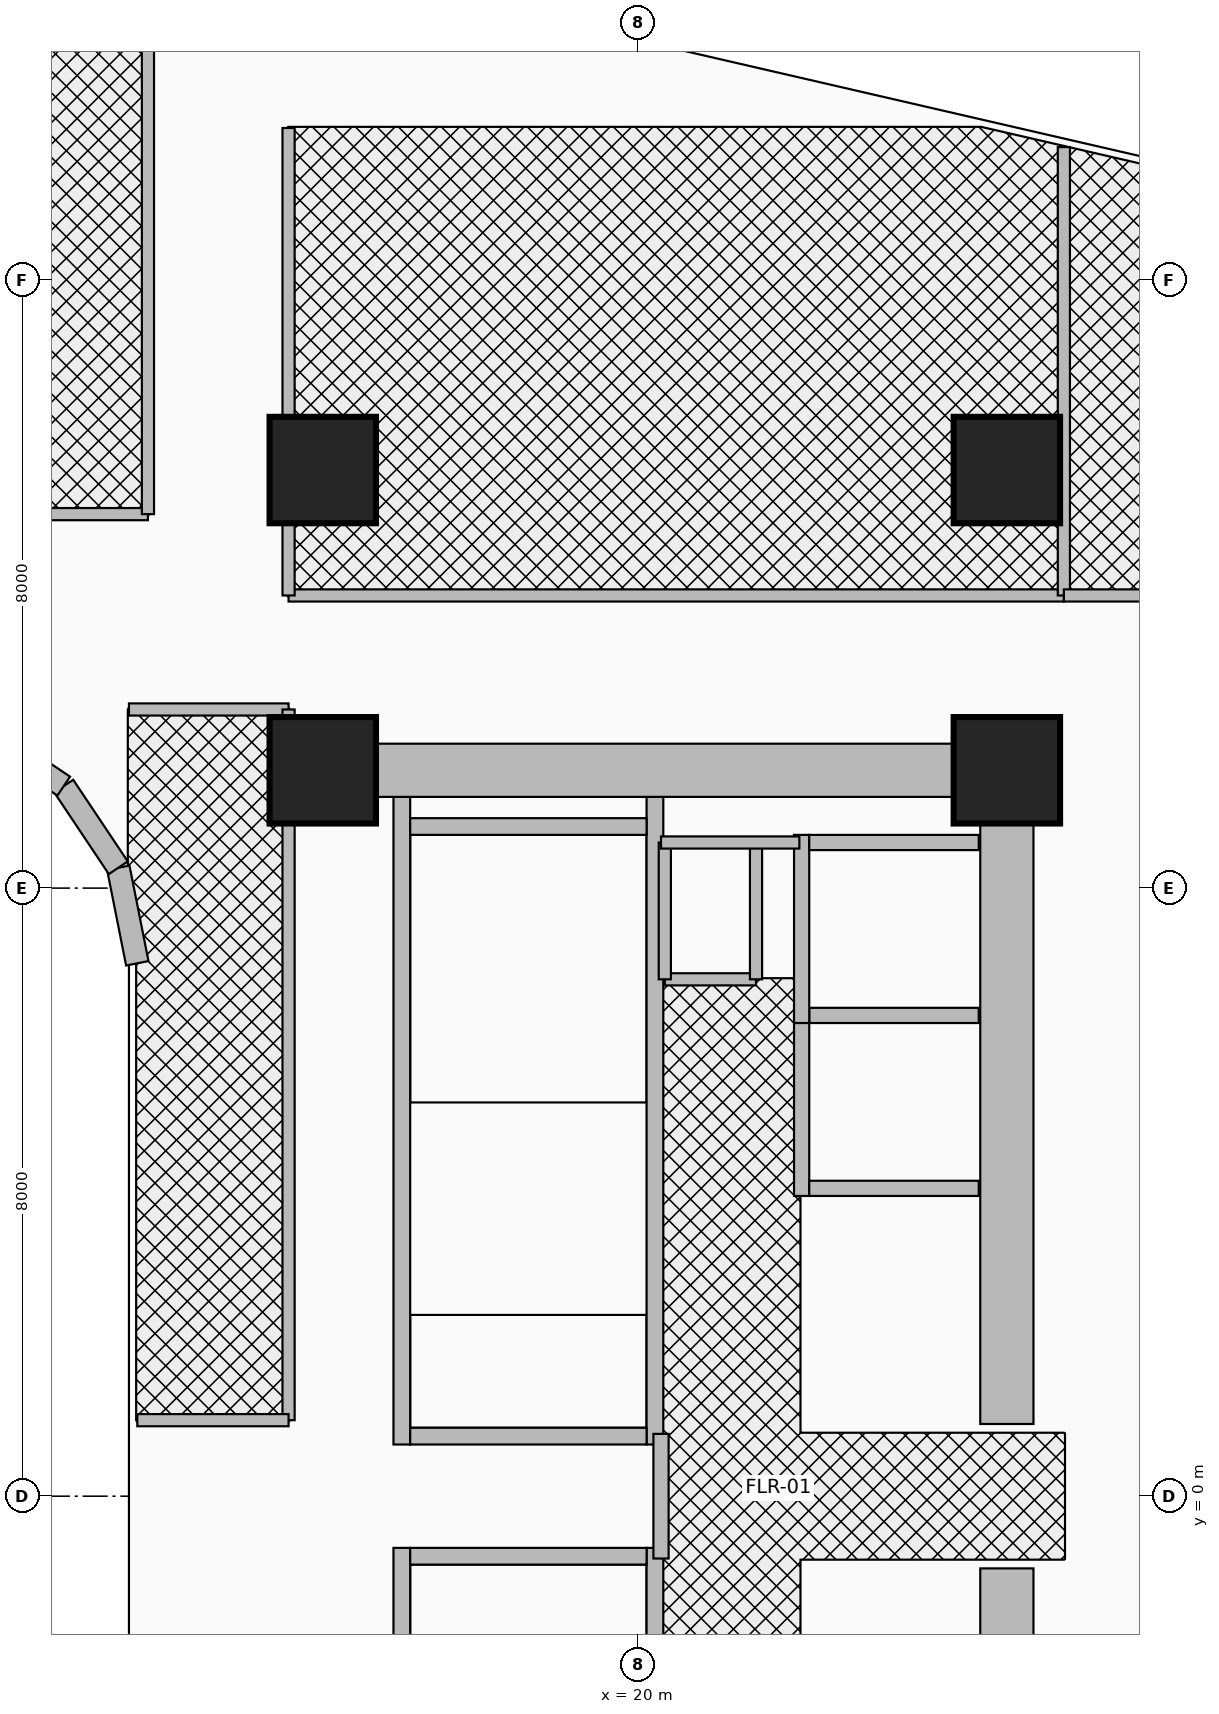
"""IFC4 building model, lengths in metres.
Left out: names, types, materials, properties, quantities, classifications, styles, units other than length and angle.
Written with IfcOpenShell. Run it as: python <this file> out.ifc"""

import sys

from ifc_helpers import new_model, si_unit, direction, frame, frame_2d, origin, origin_2d, place, context, subcontext, project, spatial, rectangle, extrude, source, transform, mapped, element, fill, save


model = new_model("IFC4")
c1 = context("Model", 3, precision=1e-05, world=origin(), true_north=direction((0.0, 1.0)))
c2 = subcontext(c1, "Body", "Model", "MODEL_VIEW")
j1 = project(units=[si_unit("LENGTHUNIT", "METRE"), si_unit("PLANEANGLEUNIT", "RADIAN")], contexts=[c1])
p1 = place(None, origin())
s1 = spatial("IfcSite", under=j1, at=p1, CompositionType="ELEMENT")
p2 = place(p1, origin())
s2 = spatial("IfcBuilding", under=s1, at=p2, CompositionType="ELEMENT")
p3 = place(p2, frame((0.0, 0.0, 70.4)))
s3 = spatial("IfcBuildingStorey", under=s2, at=p3, CompositionType="ELEMENT", Elevation=70.4)
for number, where, z_axis, x_axis in (
    (1, (16.89, 0.68, 0.0), (0.0, 0.0, 1.0), (0.0, 1.0, 0.0)),
    (2, (20.22, 0.68, 0.0), (0.0, 0.0, 1.0), (0.0, 1.0, 0.0)),
):
    element("IfcWall", number, at=place(p3, frame(where, z_axis=z_axis, x_axis=x_axis)), inside=s3, PredefinedType="SHEAR", context=c2, shape_type="SweptSolid", body=[
        extrude(rectangle(XDim=8.52, YDim=0.22, at=frame_2d((4.26, 0.0))), origin(), (0.0, 0.0, 1.0), 3.46),
    ])
p4 = place(p3, frame((17.0, 0.79, 0.0), z_axis=(0.0, 0.0, 1.0), x_axis=(1.0, 0.0, 0.0)))
e3 = element("IfcWall", 3, at=p4, inside=s3, PredefinedType="SHEAR", context=c2, shape_type="SweptSolid", body=[
    extrude(rectangle(XDim=3.11, YDim=0.22, at=frame_2d((1.555, 0.0))), origin(), (0.0, 0.0, 1.0), 3.46),
])
p5 = place(p4, frame((0.95, 0.0, 0.0)))
e4 = element("IfcOpeningElement", 4, at=p5, cuts=e3, PredefinedType="OPENING", context=c2, shape_type="SweptSolid", body=[
    extrude(rectangle(XDim=1.1, YDim=2.15, at=frame_2d((0.55, 1.075))), frame((0.0, 0.125, 0.0), z_axis=(0.0, -1.0, 0.0), x_axis=(1.0, 0.0, 0.0)), (0.0, 0.0, 1.0), 0.25),
])
p6 = place(p3, frame((17.0, 8.81, 0.0), z_axis=(0.0, 0.0, 1.0), x_axis=(1.0, 0.0, 0.0)))
e5 = element("IfcWall", 5, at=p6, inside=s3, PredefinedType="SHEAR", context=c2, shape_type="SweptSolid", body=[
    extrude(rectangle(XDim=3.11, YDim=0.22, at=frame_2d((1.555, 0.0))), origin(), (0.0, 0.0, 1.0), 3.46),
])
for number, where, z_axis, x_axis in (
    (6, (16.89, -9.2, 0.0), (0.0, 0.0, 1.0), (0.0, 1.0, 0.0)),
    (7, (20.22, -9.2, 0.0), (0.0, 0.0, 1.0), (0.0, 1.0, 0.0)),
):
    element("IfcWall", number, at=place(p3, frame(where, z_axis=z_axis, x_axis=x_axis)), inside=s3, PredefinedType="SHEAR", context=c2, shape_type="SweptSolid", body=[
        extrude(rectangle(XDim=8.52, YDim=0.22, at=frame_2d((4.26, 0.0))), origin(), (0.0, 0.0, 1.0), 3.46),
    ])
p7 = place(p3, frame((17.0, -0.79, 0.0), z_axis=(0.0, 0.0, 1.0), x_axis=(1.0, 0.0, 0.0)))
e8 = element("IfcWall", 8, at=p7, inside=s3, PredefinedType="SHEAR", context=c2, shape_type="SweptSolid", body=[
    extrude(rectangle(XDim=3.11, YDim=0.22, at=frame_2d((1.555, 0.0))), origin(), (0.0, 0.0, 1.0), 3.46),
])
p8 = place(p7, frame((0.95, 0.0, 0.0)))
e9 = element("IfcOpeningElement", 9, at=p8, cuts=e8, PredefinedType="OPENING", context=c2, shape_type="SweptSolid", body=[
    extrude(rectangle(XDim=1.1, YDim=2.15, at=frame_2d((0.55, 1.075))), frame((0.0, 0.125, 0.0), z_axis=(0.0, -1.0, 0.0), x_axis=(1.0, 0.0, 0.0)), (0.0, 0.0, 1.0), 0.25),
])
for number, where, z_axis, x_axis in (
    (10, (24.85, -9.9, 0.0), (0.0, 0.0, 1.0), (0.0, 1.0, 0.0)),
    (11, (24.85, 0.95, 0.0), (0.0, 0.0, 1.0), (0.0, 1.0, 0.0)),
):
    element("IfcWall", number, at=place(p3, frame(where, z_axis=z_axis, x_axis=x_axis)), inside=s3, PredefinedType="SHEAR", context=c2, shape_type="SweptSolid", body=[
        extrude(rectangle(XDim=8.95, YDim=0.7, at=frame_2d((4.475, 0.0))), origin(), (0.0, 0.0, 1.0), 3.46),
    ])
p9 = place(p3, frame((15.85, 9.55, 0.0), z_axis=(0.0, 0.0, 1.0), x_axis=(1.0, 0.0, 0.0)))
e12 = element("IfcWall", 12, at=p9, inside=s3, PredefinedType="SHEAR", context=c2, shape_type="SweptSolid", body=[
    extrude(rectangle(XDim=9.0, YDim=0.7, at=frame_2d((4.5, 0.0))), origin(), (0.0, 0.0, 1.0), 3.46),
])
m1 = source(origin(), c2, "Body", "SweptSolid", [
    extrude(rectangle(XDim=1.4, YDim=1.4, at=origin_2d()), origin(), (0.0, 0.0, 1.0), 3.7),
])
for number, where, z_axis, x_axis in (
    (13, (15.85, 9.55, 0.0), (0.0, 0.0, 1.0), (1.0, 0.0, 0.0)),
    (14, (24.85, 9.55, 0.0), (0.0, 0.0, 1.0), (1.0, 0.0, 0.0)),
    (15, (15.85, 13.5, 0.0), (0.0, 0.0, 1.0), (1.0, 0.0, 0.0)),
    (16, (24.85, 13.5, 0.0), (0.0, 0.0, 1.0), (1.0, 0.0, 0.0)),
):
    element("IfcColumn", number, at=place(p3, frame(where, z_axis=z_axis, x_axis=x_axis)), inside=s3, PredefinedType="COLUMN", context=c2, shape_type="MappedRepresentation", body=[
        mapped(m1, transform((0.0, 0.0, 0.0), x_axis=(1.0, 0.0, 0.0), y_axis=(0.0, 1.0, 0.0), z_axis=(0.0, 0.0, 1.0), scale=1.0)),
    ])
p10 = place(p3, frame((13.41, 7.011, 0.0), z_axis=(0.0, 0.0, 1.0), x_axis=(-0.195090163074, 0.980785312019, 0.0)))
e17 = element("IfcWall", 17, at=p10, inside=s3, PredefinedType="SOLIDWALL", context=c2, shape_type="SweptSolid", body=[
    extrude(rectangle(XDim=1.281, YDim=0.3, at=frame_2d((0.641, 0.0))), origin(), (0.0, 0.0, 1.0), 3.46),
])
for number, where, z_axis, x_axis in (
    (18, (13.16, 8.268, 0.0), (0.0, 0.0, 1.0), (-0.556, 0.831, 0.0)),
    (19, (12.442, 9.342, 0.0), (0.0, 0.0, 1.0), (-0.831, 0.556, 0.0)),
):
    element("IfcWall", number, at=place(p3, frame(where, z_axis=z_axis, x_axis=x_axis)), inside=s3, PredefinedType="SOLIDWALL", context=c2, shape_type="SweptSolid", body=[
        extrude(rectangle(XDim=1.292, YDim=0.3, at=frame_2d((0.646, 0.0))), origin(), (0.0, 0.0, 1.0), 3.46),
    ])
p11 = place(p3, frame((22.15, 3.95, 0.0), z_axis=(0.0, 0.0, 1.0), x_axis=(0.0, 1.0, 0.0)))
e20 = element("IfcWall", 20, at=p11, inside=s3, PredefinedType="MOVABLE", context=c2, shape_type="SweptSolid", body=[
    extrude(rectangle(XDim=2.475, YDim=0.2, at=frame_2d((1.238, 0.0))), origin(), (0.0, 0.0, 1.0), 3.46),
])
for number, where, z_axis, x_axis in (
    (21, (22.25, 4.05, 0.0), (0.0, 0.0, 1.0), (1.0, 0.0, 0.0)),
    (22, (22.25, 6.325, 0.0), (0.0, 0.0, 1.0), (1.0, 0.0, 0.0)),
):
    element("IfcWall", number, at=place(p3, frame(where, z_axis=z_axis, x_axis=x_axis)), inside=s3, PredefinedType="MOVABLE", context=c2, shape_type="SweptSolid", body=[
        extrude(rectangle(XDim=2.23, YDim=0.2, at=frame_2d((1.115, 0.0))), origin(), (0.0, 0.0, 1.0), 2.245),
    ])
p12 = place(p3, frame((22.15, 6.225, 0.0), z_axis=(0.0, 0.0, 1.0), x_axis=(0.0, 1.0, 0.0)))
e23 = element("IfcWall", 23, at=p12, inside=s3, PredefinedType="MOVABLE", context=c2, shape_type="SweptSolid", body=[
    extrude(rectangle(XDim=2.475, YDim=0.2, at=frame_2d((1.237, 0.0))), origin(), (0.0, 0.0, 1.0), 3.46),
])
p13 = place(p3, frame((22.25, 8.6, 0.0), z_axis=(0.0, 0.0, 1.0), x_axis=(1.0, 0.0, 0.0)))
e24 = element("IfcWall", 24, at=p13, inside=s3, PredefinedType="MOVABLE", context=c2, shape_type="SweptSolid", body=[
    extrude(rectangle(XDim=2.23, YDim=0.2, at=frame_2d((1.115, 0.0))), origin(), (0.0, 0.0, 1.0), 2.245),
])
p14 = place(p3, frame((20.3, -0.82, 0.0), z_axis=(0.0, 0.0, 1.0), x_axis=(0.0, 1.0, 0.0)))
e25 = element("IfcWall", 25, at=p14, inside=s3, PredefinedType="PARTITIONING", context=c2, shape_type="SweptSolid", body=[
    extrude(rectangle(XDim=1.64, YDim=0.2, at=frame_2d((0.82, 0.0))), origin(), (0.0, 0.0, 1.0), 3.46),
])
p15 = place(p14, frame((0.295, 0.0, 0.0)))
e26 = element("IfcOpeningElement", 26, at=p15, cuts=e25, PredefinedType="OPENING", context=c2, shape_type="SweptSolid", body=[
    extrude(rectangle(XDim=1.05, YDim=2.15, at=frame_2d((0.525, 1.075))), frame((0.0, 0.115, 0.0), z_axis=(0.0, -1.0, 0.0), x_axis=(1.0, 0.0, 0.0)), (0.0, 0.0, 1.0), 0.23),
])
p16 = place(p3, frame((20.35, 6.8, 0.0), z_axis=(0.0, 0.0, 1.0), x_axis=(1.0, 0.0, 0.0)))
e27 = element("IfcWall", 27, at=p16, inside=s3, PredefinedType="PARTITIONING", context=c2, shape_type="SweptSolid", body=[
    extrude(rectangle(XDim=1.2, YDim=0.16, at=frame_2d((0.6, 0.0))), origin(), (0.0, 0.0, 1.0), 3.46),
])
p17 = place(p16, frame((0.175, 0.0, 0.0)))
e28 = element("IfcOpeningElement", 28, at=p17, cuts=e27, PredefinedType="OPENING", context=c2, shape_type="SweptSolid", body=[
    extrude(rectangle(XDim=0.85, YDim=2.05, at=frame_2d((0.425, 1.025))), frame((0.0, 0.095, 0.0), z_axis=(0.0, -1.0, 0.0), x_axis=(1.0, 0.0, 0.0)), (0.0, 0.0, 1.0), 0.19),
])
for number, where, z_axis, x_axis in (
    (29, (21.55, 6.8, 0.0), (0.0, 0.0, 1.0), (0.0, 1.0, 0.0)),
    (30, (20.35, 6.8, 0.0), (0.0, 0.0, 1.0), (0.0, 1.0, 0.0)),
):
    element("IfcWall", number, at=place(p3, frame(where, z_axis=z_axis, x_axis=x_axis)), inside=s3, PredefinedType="PARTITIONING", context=c2, shape_type="SweptSolid", body=[
        extrude(rectangle(XDim=1.8, YDim=0.16, at=frame_2d((0.9, 0.0))), origin(), (0.0, 0.0, 1.0), 3.46),
    ])
p18 = place(p3, frame((20.3, 8.6, 0.0), z_axis=(0.0, 0.0, 1.0), x_axis=(1.0, 0.0, 0.0)))
e31 = element("IfcWall", 31, at=p18, inside=s3, PredefinedType="PARTITIONING", context=c2, shape_type="SweptSolid", body=[
    extrude(rectangle(XDim=1.82, YDim=0.16, at=frame_2d((0.91, 0.0))), origin(), (0.0, 0.0, 1.0), 3.46),
])
p19 = place(p3, frame((-31.89, 12.92, 0.0), z_axis=(0.0, 0.0, 1.0), x_axis=(1.0, 0.0, 0.0)))
e32 = element("IfcWall", 32, at=p19, inside=s3, PredefinedType="PARTITIONING", context=c2, shape_type="SweptSolid", body=[
    extrude(rectangle(XDim=45.44, YDim=0.16, at=frame_2d((22.72, 0.0))), origin(), (0.0, 0.0, 1.0), 2.583),
])
p20 = place(p19, frame((10.448, 0.0, 0.0)))
e33 = element("IfcOpeningElement", 33, at=p20, cuts=e32, PredefinedType="OPENING", context=c2, shape_type="SweptSolid", body=[
    extrude(rectangle(XDim=0.9, YDim=2.1, at=frame_2d((0.45, 1.05))), frame((0.0, 0.095, 0.0), z_axis=(0.0, -1.0, 0.0), x_axis=(1.0, 0.0, 0.0)), (0.0, 0.0, 1.0), 0.19),
])
p21 = place(p19, frame((33.167, 0.0, 0.0)))
e34 = element("IfcOpeningElement", 34, at=p21, cuts=e32, PredefinedType="OPENING", context=c2, shape_type="SweptSolid", body=[
    extrude(rectangle(XDim=0.9, YDim=2.1, at=frame_2d((0.45, 1.05))), frame((0.0, 0.095, 0.0), z_axis=(0.0, -1.0, 0.0), x_axis=(1.0, 0.0, 0.0)), (0.0, 0.0, 1.0), 0.19),
])
p22 = place(p3, frame((13.55, 12.92, 0.0), z_axis=(0.0, 0.0, 1.0), x_axis=(0.0, 1.0, 0.0)))
e35 = element("IfcWall", 35, at=p22, inside=s3, PredefinedType="PARTITIONING", context=c2, shape_type="SweptSolid", body=[
    extrude(rectangle(XDim=7.609, YDim=0.16, at=frame_2d((3.805, 0.0))), origin(), (0.0, 0.0, 1.0), 2.583),
])
p23 = place(p3, frame((15.4, 11.85, 0.0), z_axis=(0.0, 0.0, 1.0), x_axis=(1.0, 0.0, 0.0)))
e36 = element("IfcWall", 36, at=p23, inside=s3, PredefinedType="PARTITIONING", context=c2, shape_type="SweptSolid", body=[
    extrude(rectangle(XDim=10.2, YDim=0.16, at=frame_2d((5.1, 0.0))), origin(), (0.0, 0.0, 1.0), 2.834),
])
p24 = place(p23, frame((4.65, 0.0, 0.0)))
e37 = element("IfcOpeningElement", 37, at=p24, cuts=e36, PredefinedType="OPENING", context=c2, shape_type="SweptSolid", body=[
    extrude(rectangle(XDim=0.9, YDim=2.1, at=frame_2d((0.45, 1.05))), frame((0.0, 0.095, 0.0), z_axis=(0.0, -1.0, 0.0), x_axis=(1.0, 0.0, 0.0)), (0.0, 0.0, 1.0), 0.19),
])
p25 = place(p3, frame((15.4, 11.85, 0.0), z_axis=(0.0, 0.0, 1.0), x_axis=(0.0, 1.0, 0.0)))
e38 = element("IfcWall", 38, at=p25, inside=s3, PredefinedType="PARTITIONING", context=c2, shape_type="SweptSolid", body=[
    extrude(rectangle(XDim=6.15, YDim=0.16, at=frame_2d((3.075, 0.0))), origin(), (0.0, 0.0, 1.0), 2.583),
])
p26 = place(p3, frame((25.6, 11.85, 0.0), z_axis=(0.0, 0.0, 1.0), x_axis=(0.0, 1.0, 0.0)))
e39 = element("IfcWall", 39, at=p26, inside=s3, PredefinedType="PARTITIONING", context=c2, shape_type="SweptSolid", body=[
    extrude(rectangle(XDim=5.898, YDim=0.16, at=frame_2d((2.949, 0.0))), origin(), (0.0, 0.0, 1.0), 2.583),
])
p27 = place(p3, frame((25.6, 11.85, 0.0), z_axis=(0.0, 0.0, 1.0), x_axis=(1.0, 0.0, 0.0)))
e40 = element("IfcWall", 40, at=p27, inside=s3, PredefinedType="PARTITIONING", context=c2, shape_type="SweptSolid", body=[
    extrude(rectangle(XDim=5.79, YDim=0.16, at=frame_2d((2.895, 0.0))), origin(), (0.0, 0.0, 1.0), 2.896),
])
p28 = place(p27, frame((0.3, 0.0, 0.0)))
e41 = element("IfcOpeningElement", 41, at=p28, cuts=e40, PredefinedType="OPENING", context=c2, shape_type="SweptSolid", body=[
    extrude(rectangle(XDim=0.9, YDim=2.1, at=frame_2d((0.45, 1.05))), frame((0.0, 0.095, 0.0), z_axis=(0.0, -1.0, 0.0), x_axis=(1.0, 0.0, 0.0)), (0.0, 0.0, 1.0), 0.19),
])
p29 = place(p3, frame((13.3, 10.35, 0.0), z_axis=(0.0, 0.0, 1.0), x_axis=(1.0, 0.0, 0.0)))
e42 = element("IfcWall", 42, at=p29, inside=s3, PredefinedType="PARTITIONING", context=c2, shape_type="SweptSolid", body=[
    extrude(rectangle(XDim=2.1, YDim=0.16, at=frame_2d((1.05, 0.0))), origin(), (0.0, 0.0, 1.0), 2.583),
])
p30 = place(p29, frame((0.45, 0.0, 0.0)))
e43 = element("IfcOpeningElement", 43, at=p30, cuts=e42, PredefinedType="OPENING", context=c2, shape_type="SweptSolid", body=[
    extrude(rectangle(XDim=0.9, YDim=2.1, at=frame_2d((0.45, 1.05))), frame((0.0, 0.095, 0.0), z_axis=(0.0, -1.0, 0.0), x_axis=(1.0, 0.0, 0.0)), (0.0, 0.0, 1.0), 0.19),
])
p31 = place(p3, frame((15.4, 1.0, 0.0), z_axis=(0.0, 0.0, 1.0), x_axis=(0.0, 1.0, 0.0)))
e44 = element("IfcWall", 44, at=p31, inside=s3, PredefinedType="PARTITIONING", context=c2, shape_type="SweptSolid", body=[
    extrude(rectangle(XDim=9.35, YDim=0.16, at=frame_2d((4.675, 0.0))), origin(), (0.0, 0.0, 1.0), 2.245),
])
p32 = place(p3, frame((13.41, 1.0, 0.0), z_axis=(0.0, 0.0, 1.0), x_axis=(1.0, 0.0, 0.0)))
e45 = element("IfcWall", 45, at=p32, inside=s3, PredefinedType="PARTITIONING", context=c2, shape_type="SweptSolid", body=[
    extrude(rectangle(XDim=1.99, YDim=0.16, at=frame_2d((0.995, 0.0))), origin(), (0.0, 0.0, 1.0), 2.245),
])
p33 = place(p15, origin())
e46 = element("IfcDoor", 46, at=p33, inside=s3, OperationType="SINGLE_SWING_RIGHT", PredefinedType="DOOR", context=c2, shape_type="SweptSolid", body=[
    extrude(rectangle(XDim=1.05, YDim=2.15, at=frame_2d((0.525, 1.075))), frame((0.0, 0.025, 0.0), z_axis=(0.0, -1.0, 0.0), x_axis=(1.0, 0.0, 0.0)), (0.0, 0.0, 1.0), 0.05),
])
fill(e26, e46)
p34 = place(p5, frame((1.1, 0.0, 0.0), z_axis=(0.0, 0.0, 1.0), x_axis=(-1.0, 0.0, 0.0)))
e47 = element("IfcDoor", 47, at=p34, inside=s3, OperationType="SINGLE_SWING_LEFT", PredefinedType="DOOR", context=c2, shape_type="SweptSolid", body=[
    extrude(rectangle(XDim=1.1, YDim=2.15, at=frame_2d((0.55, 1.075))), frame((0.0, 0.025, 0.0), z_axis=(0.0, -1.0, 0.0), x_axis=(1.0, 0.0, 0.0)), (0.0, 0.0, 1.0), 0.05),
])
fill(e4, e47)
p35 = place(p8, origin())
e48 = element("IfcDoor", 48, at=p35, inside=s3, OperationType="SINGLE_SWING_RIGHT", PredefinedType="DOOR", context=c2, shape_type="SweptSolid", body=[
    extrude(rectangle(XDim=1.1, YDim=2.15, at=frame_2d((0.55, 1.075))), frame((0.0, 0.025, 0.0), z_axis=(0.0, -1.0, 0.0), x_axis=(1.0, 0.0, 0.0)), (0.0, 0.0, 1.0), 0.05),
])
fill(e9, e48)
p36 = place(p17, origin())
e49 = element("IfcDoor", 49, at=p36, inside=s3, OperationType="SINGLE_SWING_LEFT", PredefinedType="DOOR", context=c2, shape_type="SweptSolid", body=[
    extrude(rectangle(XDim=0.85, YDim=2.05, at=frame_2d((0.425, 1.025))), frame((0.0, 0.025, 0.0), z_axis=(0.0, -1.0, 0.0), x_axis=(1.0, 0.0, 0.0)), (0.0, 0.0, 1.0), 0.05),
])
fill(e28, e49)
p37 = place(p24, frame((0.9, 0.0, 0.0), z_axis=(0.0, 0.0, 1.0), x_axis=(-1.0, 0.0, 0.0)))
e50 = element("IfcDoor", 50, at=p37, inside=s3, OperationType="SINGLE_SWING_LEFT", PredefinedType="DOOR", context=c2, shape_type="SweptSolid", body=[
    extrude(rectangle(XDim=0.9, YDim=2.1, at=frame_2d((0.45, 1.05))), frame((0.0, 0.025, 0.0), z_axis=(0.0, -1.0, 0.0), x_axis=(1.0, 0.0, 0.0)), (0.0, 0.0, 1.0), 0.05),
])
fill(e37, e50)
p38 = place(p28, origin())
e51 = element("IfcDoor", 51, at=p38, inside=s3, OperationType="SINGLE_SWING_LEFT", PredefinedType="DOOR", context=c2, shape_type="SweptSolid", body=[
    extrude(rectangle(XDim=0.9, YDim=2.1, at=frame_2d((0.45, 1.05))), frame((0.0, 0.025, 0.0), z_axis=(0.0, -1.0, 0.0), x_axis=(1.0, 0.0, 0.0)), (0.0, 0.0, 1.0), 0.05),
])
fill(e41, e51)
p39 = place(p30, origin())
e52 = element("IfcDoor", 52, at=p39, inside=s3, OperationType="SINGLE_SWING_RIGHT", PredefinedType="DOOR", context=c2, shape_type="SweptSolid", body=[
    extrude(rectangle(XDim=0.9, YDim=2.1, at=frame_2d((0.45, 1.05))), frame((0.0, 0.025, 0.0), z_axis=(0.0, -1.0, 0.0), x_axis=(1.0, 0.0, 0.0)), (0.0, 0.0, 1.0), 0.05),
])
fill(e43, e52)
save(model, sys.argv[1])
